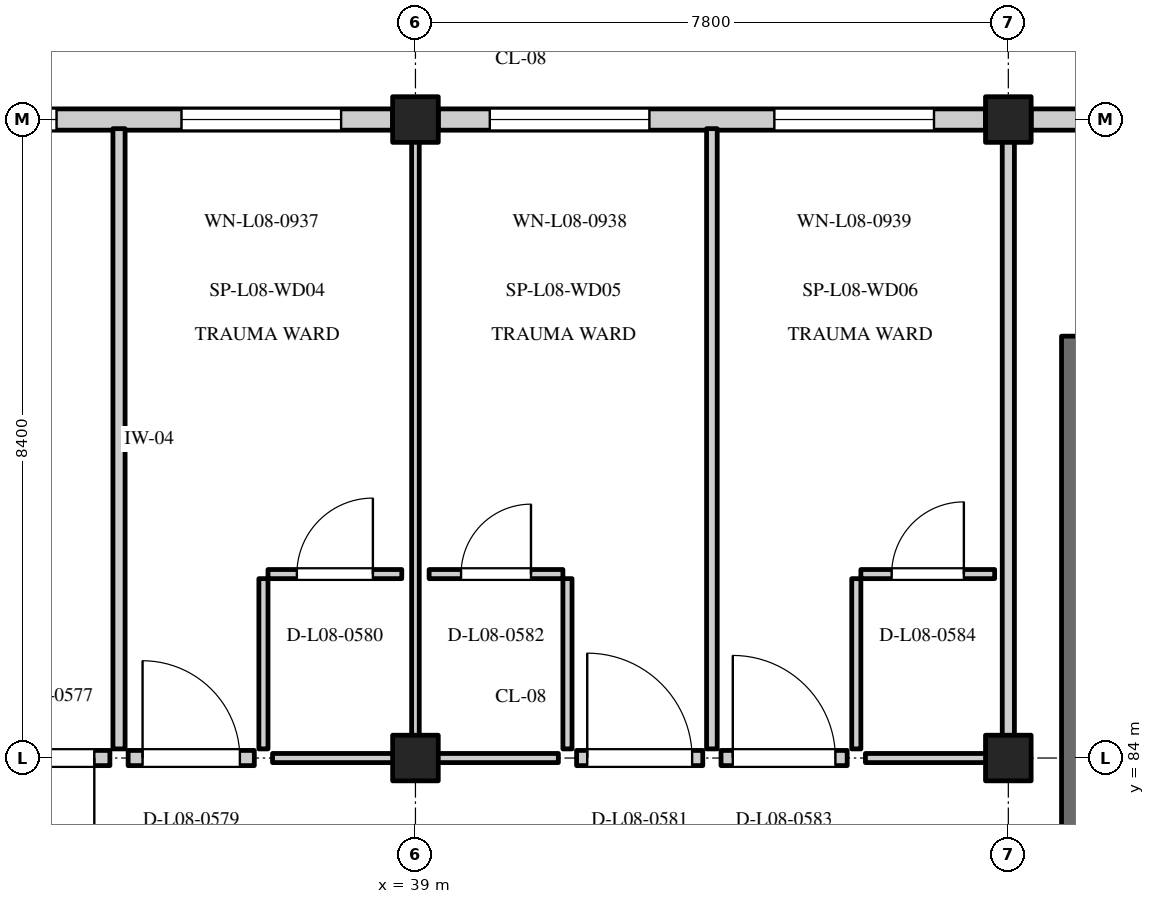
"""IFC4 building model, lengths in metres.
Left out: names, types, materials, properties, quantities, classifications, styles, units other than length and angle.
Written with IfcOpenShell. Run it as: python <this file> out.ifc"""

import sys

from ifc_helpers import new_model, si_unit, direction, frame, frame_2d, origin, origin_2d, place, context, subcontext, project, spatial, rectangle, extrude, element, fill, save


model = new_model("IFC4")
c1 = context("Model", 3, precision=1e-05, world=origin(), true_north=direction((0.0, 1.0)))
c2 = subcontext(c1, "Body", "Model", "MODEL_VIEW")
j1 = project(units=[si_unit("LENGTHUNIT", "METRE"), si_unit("PLANEANGLEUNIT", "RADIAN")], contexts=[c1])
p1 = place(None, origin())
s1 = spatial("IfcSite", under=j1, at=p1, CompositionType="ELEMENT")
p2 = place(p1, origin())
s2 = spatial("IfcBuilding", under=s1, at=p2, CompositionType="ELEMENT")
p3 = place(p2, frame((0.0, 0.0, 33.9)))
s3 = spatial("IfcBuildingStorey", under=s2, at=p3, CompositionType="ELEMENT", Elevation=33.9)
for number, where, z_axis, x_axis in (
    (1, (39.0, 84.0, 0.0), (0.0, 0.0, 1.0), (1.0, 0.0, 0.0)),
    (2, (39.0, 92.4, 0.0), (0.0, 0.0, 1.0), (1.0, 0.0, 0.0)),
    (3, (46.8, 84.0, 0.0), (0.0, 0.0, 1.0), (1.0, 0.0, 0.0)),
    (4, (46.8, 92.4, 0.0), (0.0, 0.0, 1.0), (1.0, 0.0, 0.0)),
):
    element("IfcColumn", number, at=place(p3, frame(where, z_axis=z_axis, x_axis=x_axis)), inside=s3, PredefinedType="COLUMN", context=c2, shape_type="SweptSolid", body=[
        extrude(rectangle(XDim=0.6, YDim=0.6, at=origin_2d()), origin(), (0.0, 0.0, 1.0), 3.9),
    ])
p4 = place(p3, frame((31.5, 92.4, 0.0), z_axis=(0.0, 0.0, 1.0), x_axis=(1.0, 0.0, 0.0)))
e5 = element("IfcWall", 5, at=p4, inside=s3, PredefinedType="STANDARD", context=c2, shape_type="SweptSolid", body=[
    extrude(rectangle(XDim=7.2, YDim=0.28, at=frame_2d((3.6, 0.0))), origin(), (0.0, 0.0, 1.0), 3.05),
])
p5 = place(p4, frame((0.678, 0.0, 0.8)))
e6 = element("IfcOpeningElement", 6, at=p5, cuts=e5, PredefinedType="OPENING", context=c2, shape_type="SweptSolid", body=[
    extrude(rectangle(XDim=2.1, YDim=1.75, at=frame_2d((1.05, 0.875))), frame((0.0, 0.152, 0.0), z_axis=(0.0, -1.0, 0.0), x_axis=(1.0, 0.0, 0.0)), (0.0, 0.0, 1.0), 0.304),
])
p6 = place(p4, frame((4.422, 0.0, 0.8)))
e7 = element("IfcOpeningElement", 7, at=p6, cuts=e5, PredefinedType="OPENING", context=c2, shape_type="SweptSolid", body=[
    extrude(rectangle(XDim=2.1, YDim=1.75, at=frame_2d((1.05, 0.875))), frame((0.0, 0.152, 0.0), z_axis=(0.0, -1.0, 0.0), x_axis=(1.0, 0.0, 0.0)), (0.0, 0.0, 1.0), 0.304),
])
p7 = place(p3, frame((39.3, 92.4, 0.0), z_axis=(0.0, 0.0, 1.0), x_axis=(1.0, 0.0, 0.0)))
e8 = element("IfcWall", 8, at=p7, inside=s3, PredefinedType="STANDARD", context=c2, shape_type="SweptSolid", body=[
    extrude(rectangle(XDim=7.2, YDim=0.28, at=frame_2d((3.6, 0.0))), origin(), (0.0, 0.0, 1.0), 3.05),
])
p8 = place(p7, frame((0.678, 0.0, 0.8)))
e9 = element("IfcOpeningElement", 9, at=p8, cuts=e8, PredefinedType="OPENING", context=c2, shape_type="SweptSolid", body=[
    extrude(rectangle(XDim=2.1, YDim=1.65, at=frame_2d((1.05, 0.825))), frame((0.0, 0.152, 0.0), z_axis=(0.0, -1.0, 0.0), x_axis=(1.0, 0.0, 0.0)), (0.0, 0.0, 1.0), 0.304),
])
p9 = place(p7, frame((4.422, 0.0, 0.8)))
e10 = element("IfcOpeningElement", 10, at=p9, cuts=e8, PredefinedType="OPENING", context=c2, shape_type="SweptSolid", body=[
    extrude(rectangle(XDim=2.1, YDim=1.65, at=frame_2d((1.05, 0.825))), frame((0.0, 0.152, 0.0), z_axis=(0.0, -1.0, 0.0), x_axis=(1.0, 0.0, 0.0)), (0.0, 0.0, 1.0), 0.304),
])
p10 = place(p3, frame((47.1, 92.4, 0.0), z_axis=(0.0, 0.0, 1.0), x_axis=(1.0, 0.0, 0.0)))
e11 = element("IfcWall", 11, at=p10, inside=s3, PredefinedType="STANDARD", context=c2, shape_type="SweptSolid", body=[
    extrude(rectangle(XDim=7.175, YDim=0.28, at=frame_2d((3.587, 0.0))), origin(), (0.0, 0.0, 1.0), 3.05),
])
p11 = place(p10, frame((0.678, 0.0, 0.8)))
e12 = element("IfcOpeningElement", 12, at=p11, cuts=e11, PredefinedType="OPENING", context=c2, shape_type="SweptSolid", body=[
    extrude(rectangle(XDim=2.1, YDim=1.55, at=frame_2d((1.05, 0.775))), frame((0.0, 0.152, 0.0), z_axis=(0.0, -1.0, 0.0), x_axis=(1.0, 0.0, 0.0)), (0.0, 0.0, 1.0), 0.304),
])
p12 = place(p10, frame((4.422, 0.0, 0.8)))
e13 = element("IfcOpeningElement", 13, at=p12, cuts=e11, PredefinedType="OPENING", context=c2, shape_type="SweptSolid", body=[
    extrude(rectangle(XDim=2.1, YDim=1.55, at=frame_2d((1.05, 0.775))), frame((0.0, 0.152, 0.0), z_axis=(0.0, -1.0, 0.0), x_axis=(1.0, 0.0, 0.0)), (0.0, 0.0, 1.0), 0.304),
])
p13 = place(p3, frame((47.675, 79.05, 0.0), z_axis=(0.0, 0.0, 1.0), x_axis=(0.0, 1.0, 0.0)))
e14 = element("IfcWall", 14, at=p13, inside=s3, PredefinedType="SHEAR", context=c2, shape_type="SweptSolid", body=[
    extrude(rectangle(XDim=10.5, YDim=0.35, at=frame_2d((5.25, 0.0))), origin(), (0.0, 0.0, 1.0), 3.6),
])
p14 = place(p3, frame((35.1, 84.12, 0.0), z_axis=(0.0, 0.0, 1.0), x_axis=(0.0, 1.0, 0.0)))
e15 = element("IfcWall", 15, at=p14, inside=s3, PredefinedType="PARTITIONING", context=c2, shape_type="SweptSolid", body=[
    extrude(rectangle(XDim=8.16, YDim=0.16, at=frame_2d((4.08, 0.0))), origin(), (0.0, 0.0, 1.0), 3.58),
])
p15 = place(p3, frame((33.32, 84.0, 0.0), z_axis=(0.0, 0.0, 1.0), x_axis=(1.0, 0.0, 0.0)))
e16 = element("IfcWall", 16, at=p15, inside=s3, PredefinedType="STANDARD", context=c2, shape_type="SweptSolid", body=[
    extrude(rectangle(XDim=1.66, YDim=0.2, at=frame_2d((0.83, 0.0))), origin(), (0.0, 0.0, 1.0), 2.95),
])
p16 = place(p15, frame((0.155, 0.0, 0.0)))
e17 = element("IfcOpeningElement", 17, at=p16, cuts=e16, PredefinedType="OPENING", context=c2, shape_type="SweptSolid", body=[
    extrude(rectangle(XDim=1.3, YDim=2.15, at=frame_2d((0.65, 1.075))), frame((0.0, 0.112, 0.0), z_axis=(0.0, -1.0, 0.0), x_axis=(1.0, 0.0, 0.0)), (0.0, 0.0, 1.0), 0.224),
])
p17 = place(p3, frame((39.0, 84.12, 0.0), z_axis=(0.0, 0.0, 1.0), x_axis=(0.0, 1.0, 0.0)))
e18 = element("IfcWall", 18, at=p17, inside=s3, PredefinedType="PARTITIONING", context=c2, shape_type="SweptSolid", body=[
    extrude(rectangle(XDim=8.16, YDim=0.1, at=frame_2d((4.08, 0.0))), origin(), (0.0, 0.0, 1.0), 2.95),
])
p18 = place(p3, frame((35.22, 84.0, 0.0), z_axis=(0.0, 0.0, 1.0), x_axis=(1.0, 0.0, 0.0)))
e19 = element("IfcWall", 19, at=p18, inside=s3, PredefinedType="STANDARD", context=c2, shape_type="SweptSolid", body=[
    extrude(rectangle(XDim=1.66, YDim=0.2, at=frame_2d((0.83, 0.0))), origin(), (0.0, 0.0, 1.0), 2.95),
])
p19 = place(p18, frame((0.19, 0.0, 0.0)))
e20 = element("IfcOpeningElement", 20, at=p19, cuts=e19, PredefinedType="OPENING", context=c2, shape_type="SweptSolid", body=[
    extrude(rectangle(XDim=1.28, YDim=2.15, at=frame_2d((0.64, 1.075))), frame((0.0, 0.112, 0.0), z_axis=(0.0, -1.0, 0.0), x_axis=(1.0, 0.0, 0.0)), (0.0, 0.0, 1.0), 0.224),
])
p20 = place(p3, frame((37.12, 84.0, 0.0), z_axis=(0.0, 0.0, 1.0), x_axis=(1.0, 0.0, 0.0)))
e21 = element("IfcWall", 21, at=p20, inside=s3, PredefinedType="PARTITIONING", context=c2, shape_type="SweptSolid", body=[
    extrude(rectangle(XDim=1.76, YDim=0.12, at=frame_2d((0.88, 0.0))), origin(), (0.0, 0.0, 1.0), 2.95),
])
p21 = place(p3, frame((37.0, 84.12, 0.0), z_axis=(0.0, 0.0, 1.0), x_axis=(0.0, 1.0, 0.0)))
e22 = element("IfcWall", 22, at=p21, inside=s3, PredefinedType="PARTITIONING", context=c2, shape_type="SweptSolid", body=[
    extrude(rectangle(XDim=2.24, YDim=0.12, at=frame_2d((1.12, 0.0))), origin(), (0.0, 0.0, 1.0), 3.58),
])
p22 = place(p3, frame((37.06, 86.42, 0.0), z_axis=(0.0, 0.0, 1.0), x_axis=(1.0, 0.0, 0.0)))
e23 = element("IfcWall", 23, at=p22, inside=s3, PredefinedType="PARTITIONING", context=c2, shape_type="SweptSolid", body=[
    extrude(rectangle(XDim=1.76, YDim=0.12, at=frame_2d((0.88, 0.0))), origin(), (0.0, 0.0, 1.0), 3.58),
])
p23 = place(p22, frame((0.38, 0.0, 0.0)))
e24 = element("IfcOpeningElement", 24, at=p23, cuts=e23, PredefinedType="OPENING", context=c2, shape_type="SweptSolid", body=[
    extrude(rectangle(XDim=1.0, YDim=2.1, at=frame_2d((0.5, 1.05))), frame((0.0, 0.072, 0.0), z_axis=(0.0, -1.0, 0.0), x_axis=(1.0, 0.0, 0.0)), (0.0, 0.0, 1.0), 0.144),
])
p24 = place(p3, frame((42.9, 84.12, 0.0), z_axis=(0.0, 0.0, 1.0), x_axis=(0.0, 1.0, 0.0)))
e25 = element("IfcWall", 25, at=p24, inside=s3, PredefinedType="PARTITIONING", context=c2, shape_type="SweptSolid", body=[
    extrude(rectangle(XDim=8.16, YDim=0.14, at=frame_2d((4.08, 0.0))), origin(), (0.0, 0.0, 1.0), 3.58),
])
p25 = place(p3, frame((41.12, 84.0, 0.0), z_axis=(0.0, 0.0, 1.0), x_axis=(1.0, 0.0, 0.0)))
e26 = element("IfcWall", 26, at=p25, inside=s3, PredefinedType="STANDARD", context=c2, shape_type="SweptSolid", body=[
    extrude(rectangle(XDim=1.66, YDim=0.2, at=frame_2d((0.83, 0.0))), origin(), (0.0, 0.0, 1.0), 2.95),
])
p26 = place(p25, frame((0.14, 0.0, 0.0)))
e27 = element("IfcOpeningElement", 27, at=p26, cuts=e26, PredefinedType="OPENING", context=c2, shape_type="SweptSolid", body=[
    extrude(rectangle(XDim=1.38, YDim=2.2, at=frame_2d((0.69, 1.1))), frame((0.0, 0.112, 0.0), z_axis=(0.0, -1.0, 0.0), x_axis=(1.0, 0.0, 0.0)), (0.0, 0.0, 1.0), 0.224),
])
p27 = place(p3, frame((39.12, 84.0, 0.0), z_axis=(0.0, 0.0, 1.0), x_axis=(1.0, 0.0, 0.0)))
e28 = element("IfcWall", 28, at=p27, inside=s3, PredefinedType="PARTITIONING", context=c2, shape_type="SweptSolid", body=[
    extrude(rectangle(XDim=1.76, YDim=0.12, at=frame_2d((0.88, 0.0))), origin(), (0.0, 0.0, 1.0), 2.95),
])
p28 = place(p3, frame((41.0, 84.12, 0.0), z_axis=(0.0, 0.0, 1.0), x_axis=(0.0, 1.0, 0.0)))
e29 = element("IfcWall", 29, at=p28, inside=s3, PredefinedType="PARTITIONING", context=c2, shape_type="SweptSolid", body=[
    extrude(rectangle(XDim=2.24, YDim=0.12, at=frame_2d((1.12, 0.0))), origin(), (0.0, 0.0, 1.0), 3.58),
])
p29 = place(p3, frame((39.18, 86.42, 0.0), z_axis=(0.0, 0.0, 1.0), x_axis=(1.0, 0.0, 0.0)))
e30 = element("IfcWall", 30, at=p29, inside=s3, PredefinedType="PARTITIONING", context=c2, shape_type="SweptSolid", body=[
    extrude(rectangle(XDim=1.76, YDim=0.12, at=frame_2d((0.88, 0.0))), origin(), (0.0, 0.0, 1.0), 3.58),
])
p30 = place(p29, frame((0.42, 0.0, 0.0)))
e31 = element("IfcOpeningElement", 31, at=p30, cuts=e30, PredefinedType="OPENING", context=c2, shape_type="SweptSolid", body=[
    extrude(rectangle(XDim=0.92, YDim=2.08, at=frame_2d((0.46, 1.04))), frame((0.0, 0.072, 0.0), z_axis=(0.0, -1.0, 0.0), x_axis=(1.0, 0.0, 0.0)), (0.0, 0.0, 1.0), 0.144),
])
p31 = place(p3, frame((46.8, 84.12, 0.0), z_axis=(0.0, 0.0, 1.0), x_axis=(0.0, 1.0, 0.0)))
e32 = element("IfcWall", 32, at=p31, inside=s3, PredefinedType="PARTITIONING", context=c2, shape_type="SweptSolid", body=[
    extrude(rectangle(XDim=8.16, YDim=0.16, at=frame_2d((4.08, 0.0))), origin(), (0.0, 0.0, 1.0), 3.58),
])
p32 = place(p3, frame((43.02, 84.0, 0.0), z_axis=(0.0, 0.0, 1.0), x_axis=(1.0, 0.0, 0.0)))
e33 = element("IfcWall", 33, at=p32, inside=s3, PredefinedType="STANDARD", context=c2, shape_type="SweptSolid", body=[
    extrude(rectangle(XDim=1.66, YDim=0.2, at=frame_2d((0.83, 0.0))), origin(), (0.0, 0.0, 1.0), 2.95),
])
p33 = place(p32, frame((0.155, 0.0, 0.0)))
e34 = element("IfcOpeningElement", 34, at=p33, cuts=e33, PredefinedType="OPENING", context=c2, shape_type="SweptSolid", body=[
    extrude(rectangle(XDim=1.35, YDim=2.15, at=frame_2d((0.675, 1.075))), frame((0.0, 0.112, 0.0), z_axis=(0.0, -1.0, 0.0), x_axis=(1.0, 0.0, 0.0)), (0.0, 0.0, 1.0), 0.224),
])
p34 = place(p3, frame((44.92, 84.0, 0.0), z_axis=(0.0, 0.0, 1.0), x_axis=(1.0, 0.0, 0.0)))
e35 = element("IfcWall", 35, at=p34, inside=s3, PredefinedType="PARTITIONING", context=c2, shape_type="SweptSolid", body=[
    extrude(rectangle(XDim=1.76, YDim=0.12, at=frame_2d((0.88, 0.0))), origin(), (0.0, 0.0, 1.0), 2.95),
])
p35 = place(p3, frame((44.8, 84.12, 0.0), z_axis=(0.0, 0.0, 1.0), x_axis=(0.0, 1.0, 0.0)))
e36 = element("IfcWall", 36, at=p35, inside=s3, PredefinedType="PARTITIONING", context=c2, shape_type="SweptSolid", body=[
    extrude(rectangle(XDim=2.24, YDim=0.12, at=frame_2d((1.12, 0.0))), origin(), (0.0, 0.0, 1.0), 3.58),
])
p36 = place(p3, frame((44.86, 86.42, 0.0), z_axis=(0.0, 0.0, 1.0), x_axis=(1.0, 0.0, 0.0)))
e37 = element("IfcWall", 37, at=p36, inside=s3, PredefinedType="PARTITIONING", context=c2, shape_type="SweptSolid", body=[
    extrude(rectangle(XDim=1.76, YDim=0.12, at=frame_2d((0.88, 0.0))), origin(), (0.0, 0.0, 1.0), 3.58),
])
p37 = place(p36, frame((0.405, 0.0, 0.0)))
e38 = element("IfcOpeningElement", 38, at=p37, cuts=e37, PredefinedType="OPENING", context=c2, shape_type="SweptSolid", body=[
    extrude(rectangle(XDim=0.95, YDim=2.1, at=frame_2d((0.475, 1.05))), frame((0.0, 0.072, 0.0), z_axis=(0.0, -1.0, 0.0), x_axis=(1.0, 0.0, 0.0)), (0.0, 0.0, 1.0), 0.144),
])
p38 = place(p5, origin())
e39 = element("IfcWindow", 39, at=p38, inside=s3, PartitioningType="DOUBLE_PANEL_VERTICAL", PredefinedType="WINDOW", context=c2, shape_type="SweptSolid", body=[
    extrude(rectangle(XDim=2.1, YDim=1.75, at=frame_2d((1.05, 0.875))), frame((0.0, 0.03, 0.0), z_axis=(0.0, -1.0, 0.0), x_axis=(1.0, 0.0, 0.0)), (0.0, 0.0, 1.0), 0.06),
])
fill(e6, e39)
p39 = place(p6, origin())
e40 = element("IfcWindow", 40, at=p39, inside=s3, PartitioningType="DOUBLE_PANEL_VERTICAL", PredefinedType="WINDOW", context=c2, shape_type="SweptSolid", body=[
    extrude(rectangle(XDim=2.1, YDim=1.75, at=frame_2d((1.05, 0.875))), frame((0.0, 0.03, 0.0), z_axis=(0.0, -1.0, 0.0), x_axis=(1.0, 0.0, 0.0)), (0.0, 0.0, 1.0), 0.06),
])
fill(e7, e40)
p40 = place(p8, origin())
e41 = element("IfcWindow", 41, at=p40, inside=s3, PartitioningType="DOUBLE_PANEL_VERTICAL", PredefinedType="WINDOW", context=c2, shape_type="SweptSolid", body=[
    extrude(rectangle(XDim=2.1, YDim=1.65, at=frame_2d((1.05, 0.825))), frame((0.0, 0.03, 0.0), z_axis=(0.0, -1.0, 0.0), x_axis=(1.0, 0.0, 0.0)), (0.0, 0.0, 1.0), 0.06),
])
fill(e9, e41)
p41 = place(p9, origin())
e42 = element("IfcWindow", 42, at=p41, inside=s3, PartitioningType="DOUBLE_PANEL_VERTICAL", PredefinedType="WINDOW", context=c2, shape_type="SweptSolid", body=[
    extrude(rectangle(XDim=2.1, YDim=1.65, at=frame_2d((1.05, 0.825))), frame((0.0, 0.03, 0.0), z_axis=(0.0, -1.0, 0.0), x_axis=(1.0, 0.0, 0.0)), (0.0, 0.0, 1.0), 0.06),
])
fill(e10, e42)
p42 = place(p16, origin())
e43 = element("IfcDoor", 43, at=p42, inside=s3, OperationType="SINGLE_SWING_RIGHT", PredefinedType="DOOR", context=c2, shape_type="SweptSolid", body=[
    extrude(rectangle(XDim=1.3, YDim=2.15, at=frame_2d((0.65, 1.075))), frame((0.0, 0.025, 0.0), z_axis=(0.0, -1.0, 0.0), x_axis=(1.0, 0.0, 0.0)), (0.0, 0.0, 1.0), 0.05),
])
fill(e17, e43)
p43 = place(p19, origin())
e44 = element("IfcDoor", 44, at=p43, inside=s3, OperationType="SINGLE_SWING_LEFT", PredefinedType="DOOR", context=c2, shape_type="SweptSolid", body=[
    extrude(rectangle(XDim=1.28, YDim=2.15, at=frame_2d((0.64, 1.075))), frame((0.0, 0.025, 0.0), z_axis=(0.0, -1.0, 0.0), x_axis=(1.0, 0.0, 0.0)), (0.0, 0.0, 1.0), 0.05),
])
fill(e20, e44)
p44 = place(p23, frame((1.0, 0.0, 0.0), z_axis=(0.0, 0.0, 1.0), x_axis=(-1.0, 0.0, 0.0)))
e45 = element("IfcDoor", 45, at=p44, inside=s3, OperationType="SINGLE_SWING_LEFT", PredefinedType="DOOR", context=c2, shape_type="SweptSolid", body=[
    extrude(rectangle(XDim=1.0, YDim=2.1, at=frame_2d((0.5, 1.05))), frame((0.0, 0.025, 0.0), z_axis=(0.0, -1.0, 0.0), x_axis=(1.0, 0.0, 0.0)), (0.0, 0.0, 1.0), 0.05),
])
fill(e24, e45)
p45 = place(p26, origin())
e46 = element("IfcDoor", 46, at=p45, inside=s3, OperationType="SINGLE_SWING_LEFT", PredefinedType="DOOR", context=c2, shape_type="SweptSolid", body=[
    extrude(rectangle(XDim=1.38, YDim=2.2, at=frame_2d((0.69, 1.1))), frame((0.0, 0.025, 0.0), z_axis=(0.0, -1.0, 0.0), x_axis=(1.0, 0.0, 0.0)), (0.0, 0.0, 1.0), 0.05),
])
fill(e27, e46)
p46 = place(p30, frame((0.92, 0.0, 0.0), z_axis=(0.0, 0.0, 1.0), x_axis=(-1.0, 0.0, 0.0)))
e47 = element("IfcDoor", 47, at=p46, inside=s3, OperationType="SINGLE_SWING_LEFT", PredefinedType="DOOR", context=c2, shape_type="SweptSolid", body=[
    extrude(rectangle(XDim=0.92, YDim=2.08, at=frame_2d((0.46, 1.04))), frame((0.0, 0.025, 0.0), z_axis=(0.0, -1.0, 0.0), x_axis=(1.0, 0.0, 0.0)), (0.0, 0.0, 1.0), 0.05),
])
fill(e31, e47)
p47 = place(p33, origin())
e48 = element("IfcDoor", 48, at=p47, inside=s3, OperationType="SINGLE_SWING_LEFT", PredefinedType="DOOR", context=c2, shape_type="SweptSolid", body=[
    extrude(rectangle(XDim=1.35, YDim=2.15, at=frame_2d((0.675, 1.075))), frame((0.0, 0.025, 0.0), z_axis=(0.0, -1.0, 0.0), x_axis=(1.0, 0.0, 0.0)), (0.0, 0.0, 1.0), 0.05),
])
fill(e34, e48)
p48 = place(p37, frame((0.95, 0.0, 0.0), z_axis=(0.0, 0.0, 1.0), x_axis=(-1.0, 0.0, 0.0)))
e49 = element("IfcDoor", 49, at=p48, inside=s3, OperationType="SINGLE_SWING_LEFT", PredefinedType="DOOR", context=c2, shape_type="SweptSolid", body=[
    extrude(rectangle(XDim=0.95, YDim=2.1, at=frame_2d((0.475, 1.05))), frame((0.0, 0.025, 0.0), z_axis=(0.0, -1.0, 0.0), x_axis=(1.0, 0.0, 0.0)), (0.0, 0.0, 1.0), 0.05),
])
fill(e38, e49)
save(model, sys.argv[1])
